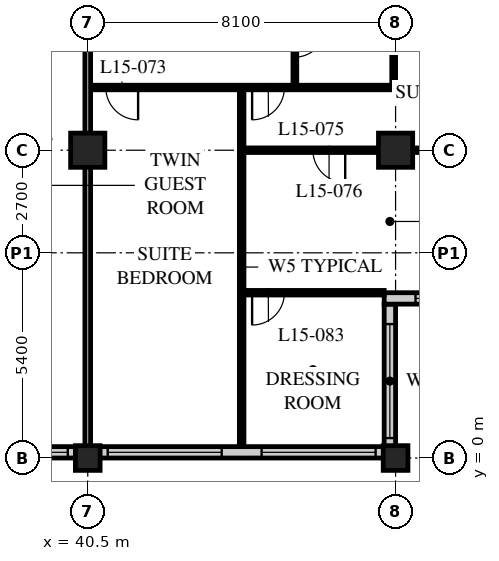
"""IFC4 building model, lengths in metres.
Left out: names, types, materials, properties, quantities, classifications, styles, units other than length and angle.
Written with IfcOpenShell. Run it as: python <this file> out.ifc"""

import sys

from ifc_helpers import new_model, si_unit, direction, frame, frame_2d, origin, origin_2d, place, context, subcontext, project, spatial, rectangle, hollow_rectangle, extrude, element, fill, save


model = new_model("IFC4")
c1 = context("Model", 3, precision=1e-05, world=origin(), true_north=direction((0.0, 1.0)))
c2 = subcontext(c1, "Body", "Model", "MODEL_VIEW")
j1 = project(units=[si_unit("LENGTHUNIT", "METRE"), si_unit("PLANEANGLEUNIT", "RADIAN")], contexts=[c1])
p1 = place(None, origin())
s1 = spatial("IfcSite", under=j1, at=p1, CompositionType="ELEMENT")
p2 = place(p1, origin())
s2 = spatial("IfcBuilding", under=s1, at=p2, CompositionType="ELEMENT")
p3 = place(p2, frame((0.0, 0.0, 63.6)))
s3 = spatial("IfcBuildingStorey", under=s2, at=p3, CompositionType="ELEMENT", Elevation=63.6)
p4 = place(p3, frame((40.5, 0.0, 0.0), z_axis=(0.0, 0.0, 1.0), x_axis=(1.0, 0.0, 0.0)))
e1 = element("IfcColumn", 1, at=p4, inside=s3, PredefinedType="COLUMN", context=c2, shape_type="SweptSolid", body=[
    extrude(hollow_rectangle(XDim=0.65, YDim=0.65, WallThickness=0.05, at=origin_2d()), origin(), (0.0, 0.0, 1.0), 3.4),
])
p5 = place(p3, frame((40.5, 8.1, 0.0), z_axis=(0.0, 0.0, 1.0), x_axis=(1.0, 0.0, 0.0)))
e2 = element("IfcColumn", 2, at=p5, inside=s3, PredefinedType="COLUMN", context=c2, shape_type="SweptSolid", body=[
    extrude(hollow_rectangle(XDim=0.9, YDim=0.9, WallThickness=0.09, at=origin_2d()), origin(), (0.0, 0.0, 1.0), 3.4),
])
p6 = place(p3, frame((48.6, 0.0, 0.0), z_axis=(0.0, 0.0, 1.0), x_axis=(1.0, 0.0, 0.0)))
e3 = element("IfcColumn", 3, at=p6, inside=s3, PredefinedType="COLUMN", context=c2, shape_type="SweptSolid", body=[
    extrude(hollow_rectangle(XDim=0.65, YDim=0.65, WallThickness=0.05, at=origin_2d()), origin(), (0.0, 0.0, 1.0), 3.4),
])
p7 = place(p3, frame((48.6, 8.1, 0.0), z_axis=(0.0, 0.0, 1.0), x_axis=(1.0, 0.0, 0.0)))
e4 = element("IfcColumn", 4, at=p7, inside=s3, PredefinedType="COLUMN", context=c2, shape_type="SweptSolid", body=[
    extrude(hollow_rectangle(XDim=0.9, YDim=0.9, WallThickness=0.09, at=origin_2d()), origin(), (0.0, 0.0, 1.0), 3.4),
])
p8 = place(p3, frame((8.4, 0.15, 0.0), z_axis=(0.0, 0.0, 1.0), x_axis=(1.0, 0.0, 0.0)))
e5 = element("IfcWall", 5, at=p8, inside=s3, PredefinedType="SOLIDWALL", context=c2, shape_type="SweptSolid", body=[
    extrude(rectangle(XDim=40.2, YDim=0.3, at=frame_2d((20.1, 0.0))), origin(), (0.0, 0.0, 1.0), 3.19),
])
p9 = place(p8, frame((0.225, 0.0, 0.9)))
e6 = element("IfcOpeningElement", 6, at=p9, cuts=e5, PredefinedType="OPENING", context=c2, shape_type="SweptSolid", body=[
    extrude(rectangle(XDim=3.0, YDim=2.0, at=frame_2d((1.5, 1.0))), frame((0.0, 0.16, 0.0), z_axis=(0.0, -1.0, 0.0), x_axis=(1.0, 0.0, 0.0)), (0.0, 0.0, 1.0), 0.32),
])
p10 = place(p8, frame((4.275, 0.0, 0.9)))
e7 = element("IfcOpeningElement", 7, at=p10, cuts=e5, PredefinedType="OPENING", context=c2, shape_type="SweptSolid", body=[
    extrude(rectangle(XDim=3.0, YDim=2.0, at=frame_2d((1.5, 1.0))), frame((0.0, 0.16, 0.0), z_axis=(0.0, -1.0, 0.0), x_axis=(1.0, 0.0, 0.0)), (0.0, 0.0, 1.0), 0.32),
])
p11 = place(p8, frame((8.325, 0.0, 0.9)))
e8 = element("IfcOpeningElement", 8, at=p11, cuts=e5, PredefinedType="OPENING", context=c2, shape_type="SweptSolid", body=[
    extrude(rectangle(XDim=3.0, YDim=2.0, at=frame_2d((1.5, 1.0))), frame((0.0, 0.16, 0.0), z_axis=(0.0, -1.0, 0.0), x_axis=(1.0, 0.0, 0.0)), (0.0, 0.0, 1.0), 0.32),
])
p12 = place(p8, frame((12.375, 0.0, 0.9)))
e9 = element("IfcOpeningElement", 9, at=p12, cuts=e5, PredefinedType="OPENING", context=c2, shape_type="SweptSolid", body=[
    extrude(rectangle(XDim=3.0, YDim=2.0, at=frame_2d((1.5, 1.0))), frame((0.0, 0.16, 0.0), z_axis=(0.0, -1.0, 0.0), x_axis=(1.0, 0.0, 0.0)), (0.0, 0.0, 1.0), 0.32),
])
p13 = place(p8, frame((16.425, 0.0, 0.9)))
e10 = element("IfcOpeningElement", 10, at=p13, cuts=e5, PredefinedType="OPENING", context=c2, shape_type="SweptSolid", body=[
    extrude(rectangle(XDim=3.0, YDim=2.0, at=frame_2d((1.5, 1.0))), frame((0.0, 0.16, 0.0), z_axis=(0.0, -1.0, 0.0), x_axis=(1.0, 0.0, 0.0)), (0.0, 0.0, 1.0), 0.32),
])
p14 = place(p8, frame((20.475, 0.0, 0.9)))
e11 = element("IfcOpeningElement", 11, at=p14, cuts=e5, PredefinedType="OPENING", context=c2, shape_type="SweptSolid", body=[
    extrude(rectangle(XDim=3.0, YDim=2.0, at=frame_2d((1.5, 1.0))), frame((0.0, 0.16, 0.0), z_axis=(0.0, -1.0, 0.0), x_axis=(1.0, 0.0, 0.0)), (0.0, 0.0, 1.0), 0.32),
])
p15 = place(p8, frame((24.525, 0.0, 0.9)))
e12 = element("IfcOpeningElement", 12, at=p15, cuts=e5, PredefinedType="OPENING", context=c2, shape_type="SweptSolid", body=[
    extrude(rectangle(XDim=3.0, YDim=2.0, at=frame_2d((1.5, 1.0))), frame((0.0, 0.16, 0.0), z_axis=(0.0, -1.0, 0.0), x_axis=(1.0, 0.0, 0.0)), (0.0, 0.0, 1.0), 0.32),
])
p16 = place(p8, frame((28.575, 0.0, 0.9)))
e13 = element("IfcOpeningElement", 13, at=p16, cuts=e5, PredefinedType="OPENING", context=c2, shape_type="SweptSolid", body=[
    extrude(rectangle(XDim=3.0, YDim=2.0, at=frame_2d((1.5, 1.0))), frame((0.0, 0.16, 0.0), z_axis=(0.0, -1.0, 0.0), x_axis=(1.0, 0.0, 0.0)), (0.0, 0.0, 1.0), 0.32),
])
p17 = place(p8, frame((32.625, 0.0, 0.9)))
e14 = element("IfcOpeningElement", 14, at=p17, cuts=e5, PredefinedType="OPENING", context=c2, shape_type="SweptSolid", body=[
    extrude(rectangle(XDim=3.0, YDim=2.0, at=frame_2d((1.5, 1.0))), frame((0.0, 0.16, 0.0), z_axis=(0.0, -1.0, 0.0), x_axis=(1.0, 0.0, 0.0)), (0.0, 0.0, 1.0), 0.32),
])
p18 = place(p8, frame((36.675, 0.0, 0.9)))
e15 = element("IfcOpeningElement", 15, at=p18, cuts=e5, PredefinedType="OPENING", context=c2, shape_type="SweptSolid", body=[
    extrude(rectangle(XDim=3.0, YDim=2.0, at=frame_2d((1.5, 1.0))), frame((0.0, 0.16, 0.0), z_axis=(0.0, -1.0, 0.0), x_axis=(1.0, 0.0, 0.0)), (0.0, 0.0, 1.0), 0.32),
])
p19 = place(p3, frame((48.45, 0.3, 0.0), z_axis=(0.0, 0.0, 1.0), x_axis=(0.0, 1.0, 0.0)))
e16 = element("IfcWall", 16, at=p19, inside=s3, PredefinedType="SOLIDWALL", context=c2, shape_type="SweptSolid", body=[
    extrude(rectangle(XDim=3.75, YDim=0.3, at=frame_2d((1.875, 0.0))), origin(), (0.0, 0.0, 1.0), 3.19),
])
p20 = place(p19, frame((0.225, 0.0, 0.9)))
e17 = element("IfcOpeningElement", 17, at=p20, cuts=e16, PredefinedType="OPENING", context=c2, shape_type="SweptSolid", body=[
    extrude(rectangle(XDim=3.0, YDim=1.5, at=frame_2d((1.5, 0.75))), frame((0.0, 0.16, 0.0), z_axis=(0.0, -1.0, 0.0), x_axis=(1.0, 0.0, 0.0)), (0.0, 0.0, 1.0), 0.32),
])
p21 = place(p3, frame((48.3, 4.2, 0.0), z_axis=(0.0, 0.0, 1.0), x_axis=(1.0, 0.0, 0.0)))
e18 = element("IfcWall", 18, at=p21, inside=s3, PredefinedType="SOLIDWALL", context=c2, shape_type="SweptSolid", body=[
    extrude(rectangle(XDim=4.35, YDim=0.3, at=frame_2d((2.175, 0.0))), origin(), (0.0, 0.0, 1.0), 3.19),
])
p22 = place(p21, frame((0.825, 0.0, 0.9)))
e19 = element("IfcOpeningElement", 19, at=p22, cuts=e18, PredefinedType="OPENING", context=c2, shape_type="SweptSolid", body=[
    extrude(rectangle(XDim=3.0, YDim=1.5, at=frame_2d((1.5, 0.75))), frame((0.0, 0.16, 0.0), z_axis=(0.0, -1.0, 0.0), x_axis=(1.0, 0.0, 0.0)), (0.0, 0.0, 1.0), 0.32),
])
p23 = place(p3, frame((40.5, 9.75, 0.0), z_axis=(0.0, 0.0, 1.0), x_axis=(1.0, 0.0, 0.0)))
e20 = element("IfcWall", 20, at=p23, inside=s3, PredefinedType="PARTITIONING", context=c2, shape_type="SweptSolid", body=[
    extrude(rectangle(XDim=8.05, YDim=0.12, at=frame_2d((4.025, 0.0))), origin(), (0.0, 0.0, 1.0), 3.19),
])
p24 = place(p23, frame((0.475, 0.0, 0.0)))
e21 = element("IfcOpeningElement", 21, at=p24, cuts=e20, PredefinedType="OPENING", context=c2, shape_type="SweptSolid", body=[
    extrude(rectangle(XDim=0.85, YDim=2.1, at=frame_2d((0.425, 1.05))), frame((0.0, 0.07, 0.0), z_axis=(0.0, -1.0, 0.0), x_axis=(1.0, 0.0, 0.0)), (0.0, 0.0, 1.0), 0.14),
])
p25 = place(p23, frame((4.325, 0.0, 0.0)))
e22 = element("IfcOpeningElement", 22, at=p25, cuts=e20, PredefinedType="OPENING", context=c2, shape_type="SweptSolid", body=[
    extrude(rectangle(XDim=0.85, YDim=2.1, at=frame_2d((0.425, 1.05))), frame((0.0, 0.07, 0.0), z_axis=(0.0, -1.0, 0.0), x_axis=(1.0, 0.0, 0.0)), (0.0, 0.0, 1.0), 0.14),
])
p26 = place(p3, frame((45.95, 12.15, 0.0), z_axis=(0.0, 0.0, 1.0), x_axis=(0.0, -1.0, 0.0)))
e23 = element("IfcWall", 23, at=p26, inside=s3, PredefinedType="PARTITIONING", context=c2, shape_type="SweptSolid", body=[
    extrude(rectangle(XDim=2.4, YDim=0.1, at=frame_2d((1.2, 0.0))), origin(), (0.0, 0.0, 1.0), 3.19),
])
p27 = place(p26, frame((0.8, 0.0, 0.0)))
e24 = element("IfcOpeningElement", 24, at=p27, cuts=e23, PredefinedType="OPENING", context=c2, shape_type="SweptSolid", body=[
    extrude(rectangle(XDim=0.8, YDim=2.1, at=frame_2d((0.4, 1.05))), frame((0.0, 0.06, 0.0), z_axis=(0.0, -1.0, 0.0), x_axis=(1.0, 0.0, 0.0)), (0.0, 0.0, 1.0), 0.12),
])
p28 = place(p3, frame((48.55, 12.15, 0.0), z_axis=(0.0, 0.0, 1.0), x_axis=(0.0, -1.0, 0.0)))
e25 = element("IfcWall", 25, at=p28, inside=s3, PredefinedType="PARTITIONING", context=c2, shape_type="SweptSolid", body=[
    extrude(rectangle(XDim=2.4, YDim=0.1, at=frame_2d((1.2, 0.0))), origin(), (0.0, 0.0, 1.0), 2.578),
])
p29 = place(p3, frame((44.55, 9.75, 0.0), z_axis=(0.0, 0.0, 1.0), x_axis=(0.0, -1.0, 0.0)))
e26 = element("IfcWall", 26, at=p29, inside=s3, PredefinedType="PARTITIONING", context=c2, shape_type="SweptSolid", body=[
    extrude(rectangle(XDim=9.45, YDim=0.12, at=frame_2d((4.725, 0.0))), origin(), (0.0, 0.0, 1.0), 3.19),
])
p30 = place(p3, frame((44.55, 8.1, 0.0), z_axis=(0.0, 0.0, 1.0), x_axis=(1.0, 0.0, 0.0)))
e27 = element("IfcWall", 27, at=p30, inside=s3, PredefinedType="PARTITIONING", context=c2, shape_type="SweptSolid", body=[
    extrude(rectangle(XDim=7.8, YDim=0.12, at=frame_2d((3.9, 0.0))), origin(), (0.0, 0.0, 1.0), 2.578),
])
p31 = place(p30, frame((1.875, 0.0, 0.0)))
e28 = element("IfcOpeningElement", 28, at=p31, cuts=e27, PredefinedType="OPENING", context=c2, shape_type="SweptSolid", body=[
    extrude(rectangle(XDim=0.85, YDim=2.1, at=frame_2d((0.425, 1.05))), frame((0.0, 0.07, 0.0), z_axis=(0.0, -1.0, 0.0), x_axis=(1.0, 0.0, 0.0)), (0.0, 0.0, 1.0), 0.14),
])
p32 = place(p3, frame((40.5, 12.15, 0.0), z_axis=(0.0, 0.0, 1.0), x_axis=(0.0, -1.0, 0.0)))
e29 = element("IfcWall", 29, at=p32, inside=s3, PredefinedType="PARTITIONING", context=c2, shape_type="SweptSolid", body=[
    extrude(rectangle(XDim=11.85, YDim=0.15, at=frame_2d((5.925, 0.0))), origin(), (0.0, 0.0, 1.0), 2.578),
])
p33 = place(p3, frame((44.55, 4.35, 0.0), z_axis=(0.0, 0.0, 1.0), x_axis=(1.0, 0.0, 0.0)))
e30 = element("IfcWall", 30, at=p33, inside=s3, PredefinedType="PARTITIONING", context=c2, shape_type="SweptSolid", body=[
    extrude(rectangle(XDim=3.75, YDim=0.12, at=frame_2d((1.875, 0.0))), origin(), (0.0, 0.0, 1.0), 3.19),
])
p34 = place(p33, frame((0.275, 0.0, 0.0)))
e31 = element("IfcOpeningElement", 31, at=p34, cuts=e30, PredefinedType="OPENING", context=c2, shape_type="SweptSolid", body=[
    extrude(rectangle(XDim=0.85, YDim=2.1, at=frame_2d((0.425, 1.05))), frame((0.0, 0.07, 0.0), z_axis=(0.0, -1.0, 0.0), x_axis=(1.0, 0.0, 0.0)), (0.0, 0.0, 1.0), 0.14),
])
p35 = place(p16, origin())
e32 = element("IfcWindow", 32, at=p35, inside=s3, PartitioningType="SINGLE_PANEL", PredefinedType="WINDOW", context=c2, shape_type="SweptSolid", body=[
    extrude(rectangle(XDim=3.0, YDim=2.0, at=frame_2d((1.5, 1.0))), frame((0.0, 0.03, 0.0), z_axis=(0.0, -1.0, 0.0), x_axis=(1.0, 0.0, 0.0)), (0.0, 0.0, 1.0), 0.06),
])
fill(e13, e32)
p36 = place(p17, origin())
e33 = element("IfcWindow", 33, at=p36, inside=s3, PartitioningType="SINGLE_PANEL", PredefinedType="WINDOW", context=c2, shape_type="SweptSolid", body=[
    extrude(rectangle(XDim=3.0, YDim=2.0, at=frame_2d((1.5, 1.0))), frame((0.0, 0.03, 0.0), z_axis=(0.0, -1.0, 0.0), x_axis=(1.0, 0.0, 0.0)), (0.0, 0.0, 1.0), 0.06),
])
fill(e14, e33)
p37 = place(p18, origin())
e34 = element("IfcWindow", 34, at=p37, inside=s3, PartitioningType="SINGLE_PANEL", PredefinedType="WINDOW", context=c2, shape_type="SweptSolid", body=[
    extrude(rectangle(XDim=3.0, YDim=2.0, at=frame_2d((1.5, 1.0))), frame((0.0, 0.03, 0.0), z_axis=(0.0, -1.0, 0.0), x_axis=(1.0, 0.0, 0.0)), (0.0, 0.0, 1.0), 0.06),
])
fill(e15, e34)
p38 = place(p20, origin())
e35 = element("IfcWindow", 35, at=p38, inside=s3, PartitioningType="SINGLE_PANEL", PredefinedType="WINDOW", context=c2, shape_type="SweptSolid", body=[
    extrude(rectangle(XDim=3.0, YDim=1.5, at=frame_2d((1.5, 0.75))), frame((0.0, 0.03, 0.0), z_axis=(0.0, -1.0, 0.0), x_axis=(1.0, 0.0, 0.0)), (0.0, 0.0, 1.0), 0.06),
])
fill(e17, e35)
p39 = place(p22, origin())
e36 = element("IfcWindow", 36, at=p39, inside=s3, PartitioningType="SINGLE_PANEL", PredefinedType="WINDOW", context=c2, shape_type="SweptSolid", body=[
    extrude(rectangle(XDim=3.0, YDim=1.5, at=frame_2d((1.5, 0.75))), frame((0.0, 0.03, 0.0), z_axis=(0.0, -1.0, 0.0), x_axis=(1.0, 0.0, 0.0)), (0.0, 0.0, 1.0), 0.06),
])
fill(e19, e36)
p40 = place(p24, origin())
e37 = element("IfcDoor", 37, at=p40, inside=s3, OperationType="SINGLE_SWING_LEFT", PredefinedType="DOOR", context=c2, shape_type="SweptSolid", body=[
    extrude(rectangle(XDim=0.85, YDim=2.1, at=frame_2d((0.425, 1.05))), frame((0.0, 0.025, 0.0), z_axis=(0.0, -1.0, 0.0), x_axis=(1.0, 0.0, 0.0)), (0.0, 0.0, 1.0), 0.05),
])
fill(e21, e37)
p41 = place(p27, origin())
e38 = element("IfcDoor", 38, at=p41, inside=s3, OperationType="SINGLE_SWING_LEFT", PredefinedType="DOOR", context=c2, shape_type="SweptSolid", body=[
    extrude(rectangle(XDim=0.8, YDim=2.1, at=frame_2d((0.4, 1.05))), frame((0.0, 0.025, 0.0), z_axis=(0.0, -1.0, 0.0), x_axis=(1.0, 0.0, 0.0)), (0.0, 0.0, 1.0), 0.05),
])
fill(e24, e38)
p42 = place(p25, origin())
e39 = element("IfcDoor", 39, at=p42, inside=s3, OperationType="SINGLE_SWING_RIGHT", PredefinedType="DOOR", context=c2, shape_type="SweptSolid", body=[
    extrude(rectangle(XDim=0.85, YDim=2.1, at=frame_2d((0.425, 1.05))), frame((0.0, 0.025, 0.0), z_axis=(0.0, -1.0, 0.0), x_axis=(1.0, 0.0, 0.0)), (0.0, 0.0, 1.0), 0.05),
])
fill(e22, e39)
p43 = place(p31, origin())
e40 = element("IfcDoor", 40, at=p43, inside=s3, OperationType="SINGLE_SWING_LEFT", PredefinedType="DOOR", context=c2, shape_type="SweptSolid", body=[
    extrude(rectangle(XDim=0.85, YDim=2.1, at=frame_2d((0.425, 1.05))), frame((0.0, 0.025, 0.0), z_axis=(0.0, -1.0, 0.0), x_axis=(1.0, 0.0, 0.0)), (0.0, 0.0, 1.0), 0.05),
])
fill(e28, e40)
p44 = place(p34, origin())
e41 = element("IfcDoor", 41, at=p44, inside=s3, OperationType="SINGLE_SWING_RIGHT", PredefinedType="DOOR", context=c2, shape_type="SweptSolid", body=[
    extrude(rectangle(XDim=0.85, YDim=2.1, at=frame_2d((0.425, 1.05))), frame((0.0, 0.025, 0.0), z_axis=(0.0, -1.0, 0.0), x_axis=(1.0, 0.0, 0.0)), (0.0, 0.0, 1.0), 0.05),
])
fill(e31, e41)
save(model, sys.argv[1])
